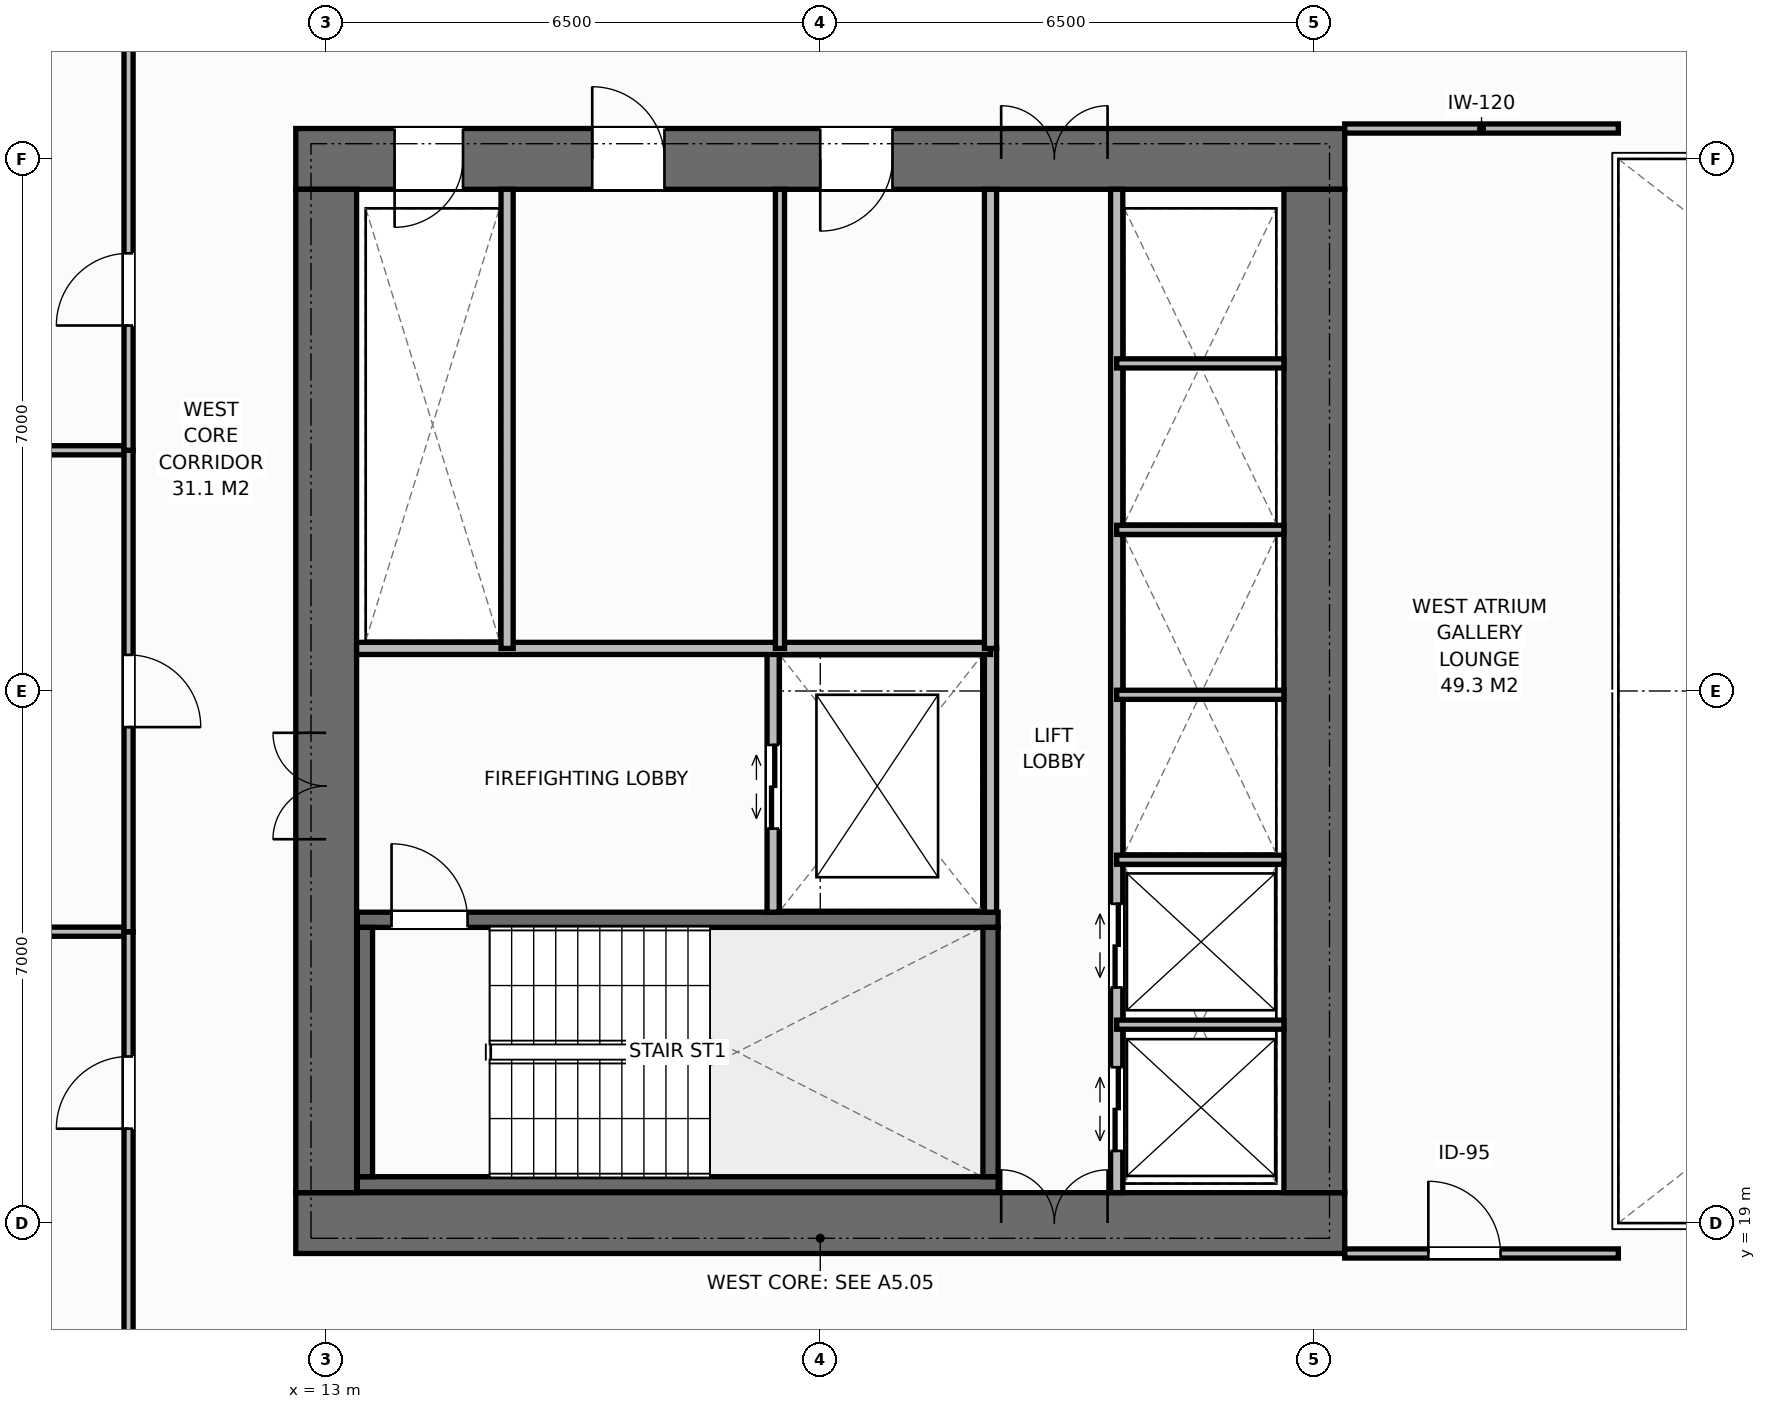
"""IFC4 building model, lengths in metres.
Left out: names, types, materials, properties, quantities, classifications, styles, units other than length and angle.
Written with IfcOpenShell. Run it as: python <this file> out.ifc"""

import sys

from ifc_helpers import new_model, si_unit, direction, frame, frame_2d, origin, place, context, subcontext, project, spatial, rectangle, extrude, element, fill, save


model = new_model("IFC4")
c1 = context("Model", 3, precision=1e-05, world=origin(), true_north=direction((0.0, 1.0)))
c2 = subcontext(c1, "Body", "Model", "MODEL_VIEW")
j1 = project(units=[si_unit("LENGTHUNIT", "METRE"), si_unit("PLANEANGLEUNIT", "RADIAN")], contexts=[c1])
p1 = place(None, origin())
s1 = spatial("IfcSite", under=j1, at=p1, CompositionType="ELEMENT")
p2 = place(p1, origin())
s2 = spatial("IfcBuilding", under=s1, at=p2, CompositionType="ELEMENT")
p3 = place(p2, frame((0.0, 0.0, 58.2)))
s3 = spatial("IfcBuildingStorey", under=s2, at=p3, CompositionType="ELEMENT", Elevation=58.2)
p4 = place(p3, frame((12.6, 19.0, 0.0), z_axis=(0.0, 0.0, 1.0), x_axis=(1.0, 0.0, 0.0)))
e1 = element("IfcWall", 1, at=p4, inside=s3, PredefinedType="SHEAR", context=c2, shape_type="SweptSolid", body=[
    extrude(rectangle(XDim=13.8, YDim=0.8, at=frame_2d((6.9, 0.0))), origin(), (0.0, 0.0, 1.0), 3.8),
])
p5 = place(p4, frame((9.28, 0.0, 0.0)))
e2 = element("IfcOpeningElement", 2, at=p5, cuts=e1, PredefinedType="OPENING", context=c2, shape_type="SweptSolid", body=[
    extrude(rectangle(XDim=1.4, YDim=2.2, at=frame_2d((0.7, 1.1))), frame((0.0, 0.41, 0.0), z_axis=(0.0, -1.0, 0.0), x_axis=(1.0, 0.0, 0.0)), (0.0, 0.0, 1.0), 0.82),
])
p6 = place(p3, frame((12.6, 33.0, 0.0), z_axis=(0.0, 0.0, 1.0), x_axis=(1.0, 0.0, 0.0)))
e3 = element("IfcWall", 3, at=p6, inside=s3, PredefinedType="SHEAR", context=c2, shape_type="SweptSolid", body=[
    extrude(rectangle(XDim=13.8, YDim=0.8, at=frame_2d((6.9, 0.0))), origin(), (0.0, 0.0, 1.0), 3.8),
])
p7 = place(p6, frame((1.3, 0.0, 0.0)))
e4 = element("IfcOpeningElement", 4, at=p7, cuts=e3, PredefinedType="OPENING", context=c2, shape_type="SweptSolid", body=[
    extrude(rectangle(XDim=0.9, YDim=2.15, at=frame_2d((0.45, 1.075))), frame((0.0, 0.41, 0.0), z_axis=(0.0, -1.0, 0.0), x_axis=(1.0, 0.0, 0.0)), (0.0, 0.0, 1.0), 0.82),
])
p8 = place(p6, frame((3.9, 0.0, 0.0)))
e5 = element("IfcOpeningElement", 5, at=p8, cuts=e3, PredefinedType="OPENING", context=c2, shape_type="SweptSolid", body=[
    extrude(rectangle(XDim=0.95, YDim=2.15, at=frame_2d((0.475, 1.075))), frame((0.0, 0.41, 0.0), z_axis=(0.0, -1.0, 0.0), x_axis=(1.0, 0.0, 0.0)), (0.0, 0.0, 1.0), 0.82),
])
p9 = place(p6, frame((6.9, 0.0, 0.0)))
e6 = element("IfcOpeningElement", 6, at=p9, cuts=e3, PredefinedType="OPENING", context=c2, shape_type="SweptSolid", body=[
    extrude(rectangle(XDim=0.95, YDim=2.15, at=frame_2d((0.475, 1.075))), frame((0.0, 0.41, 0.0), z_axis=(0.0, -1.0, 0.0), x_axis=(1.0, 0.0, 0.0)), (0.0, 0.0, 1.0), 0.82),
])
p10 = place(p6, frame((9.28, 0.0, 0.0)))
e7 = element("IfcOpeningElement", 7, at=p10, cuts=e3, PredefinedType="OPENING", context=c2, shape_type="SweptSolid", body=[
    extrude(rectangle(XDim=1.4, YDim=2.2, at=frame_2d((0.7, 1.1))), frame((0.0, 0.41, 0.0), z_axis=(0.0, -1.0, 0.0), x_axis=(1.0, 0.0, 0.0)), (0.0, 0.0, 1.0), 0.82),
])
p11 = place(p3, frame((13.0, 19.4, 0.0), z_axis=(0.0, 0.0, 1.0), x_axis=(0.0, 1.0, 0.0)))
e8 = element("IfcWall", 8, at=p11, inside=s3, PredefinedType="SHEAR", context=c2, shape_type="SweptSolid", body=[
    extrude(rectangle(XDim=13.2, YDim=0.8, at=frame_2d((6.6, 0.0))), origin(), (0.0, 0.0, 1.0), 3.8),
])
p12 = place(p11, frame((4.65, 0.0, 0.0)))
e9 = element("IfcOpeningElement", 9, at=p12, cuts=e8, PredefinedType="OPENING", context=c2, shape_type="SweptSolid", body=[
    extrude(rectangle(XDim=1.4, YDim=2.2, at=frame_2d((0.7, 1.1))), frame((0.0, 0.41, 0.0), z_axis=(0.0, -1.0, 0.0), x_axis=(1.0, 0.0, 0.0)), (0.0, 0.0, 1.0), 0.82),
])
p13 = place(p3, frame((26.0, 19.4, 0.0), z_axis=(0.0, 0.0, 1.0), x_axis=(0.0, 1.0, 0.0)))
e10 = element("IfcWall", 10, at=p13, inside=s3, PredefinedType="SHEAR", context=c2, shape_type="SweptSolid", body=[
    extrude(rectangle(XDim=13.2, YDim=0.8, at=frame_2d((6.6, 0.0))), origin(), (0.0, 0.0, 1.0), 3.8),
])
p14 = place(p3, frame((13.41, 19.51, 0.0), z_axis=(0.0, 0.0, 1.0), x_axis=(1.0, 0.0, 0.0)))
e11 = element("IfcWall", 11, at=p14, inside=s3, PredefinedType="SHEAR", context=c2, shape_type="SweptSolid", body=[
    extrude(rectangle(XDim=8.43, YDim=0.2, at=frame_2d((4.215, 0.0))), origin(), (0.0, 0.0, 1.0), 3.8),
])
p15 = place(p3, frame((13.41, 22.99, 0.0), z_axis=(0.0, 0.0, 1.0), x_axis=(1.0, 0.0, 0.0)))
e12 = element("IfcWall", 12, at=p15, inside=s3, PredefinedType="SHEAR", context=c2, shape_type="SweptSolid", body=[
    extrude(rectangle(XDim=8.43, YDim=0.2, at=frame_2d((4.215, 0.0))), origin(), (0.0, 0.0, 1.0), 3.8),
])
p16 = place(p15, frame((0.45, 0.0, 0.0)))
e13 = element("IfcOpeningElement", 13, at=p16, cuts=e12, PredefinedType="OPENING", context=c2, shape_type="SweptSolid", body=[
    extrude(rectangle(XDim=1.0, YDim=2.15, at=frame_2d((0.5, 1.075))), frame((0.0, 0.11, 0.0), z_axis=(0.0, -1.0, 0.0), x_axis=(1.0, 0.0, 0.0)), (0.0, 0.0, 1.0), 0.22),
])
for number, where, z_axis, x_axis in (
    (14, (13.51, 19.61, 0.0), (0.0, 0.0, 1.0), (0.0, 1.0, 0.0)),
    (15, (21.74, 19.61, 0.0), (0.0, 0.0, 1.0), (0.0, 1.0, 0.0)),
):
    element("IfcWall", number, at=place(p3, frame(where, z_axis=z_axis, x_axis=x_axis)), inside=s3, PredefinedType="SHEAR", context=c2, shape_type="SweptSolid", body=[
        extrude(rectangle(XDim=3.28, YDim=0.2, at=frame_2d((1.64, 0.0))), origin(), (0.0, 0.0, 1.0), 3.8),
    ])
p17 = place(p3, frame((21.74, 23.09, 0.0), z_axis=(0.0, 0.0, 1.0), x_axis=(0.0, 1.0, 0.0)))
e16 = element("IfcWall", 16, at=p17, inside=s3, PredefinedType="STANDARD", context=c2, shape_type="SweptSolid", body=[
    extrude(rectangle(XDim=3.47, YDim=0.16, at=frame_2d((1.735, 0.0))), origin(), (0.0, 0.0, 1.0), 3.55),
])
p18 = place(p3, frame((18.88, 23.09, 0.0), z_axis=(0.0, 0.0, 1.0), x_axis=(0.0, 1.0, 0.0)))
e17 = element("IfcWall", 17, at=p18, inside=s3, PredefinedType="STANDARD", context=c2, shape_type="SweptSolid", body=[
    extrude(rectangle(XDim=3.47, YDim=0.16, at=frame_2d((1.735, 0.0))), origin(), (0.0, 0.0, 1.0), 3.55),
])
p19 = place(p18, frame((1.1, 0.0, 0.0)))
e18 = element("IfcOpeningElement", 18, at=p19, cuts=e17, PredefinedType="OPENING", context=c2, shape_type="SweptSolid", body=[
    extrude(rectangle(XDim=1.1, YDim=2.2, at=frame_2d((0.55, 1.1))), frame((0.0, 0.09, 0.0), z_axis=(0.0, -1.0, 0.0), x_axis=(1.0, 0.0, 0.0)), (0.0, 0.0, 1.0), 0.18),
])
p20 = place(p3, frame((13.4, 26.56, 0.0), z_axis=(0.0, 0.0, 1.0), x_axis=(1.0, 0.0, 0.0)))
e19 = element("IfcWall", 19, at=p20, inside=s3, PredefinedType="STANDARD", context=c2, shape_type="SweptSolid", body=[
    extrude(rectangle(XDim=8.34, YDim=0.16, at=frame_2d((4.17, 0.0))), origin(), (0.0, 0.0, 1.0), 3.55),
])
p21 = place(p3, frame((15.38, 26.56, 0.0), z_axis=(0.0, 0.0, 1.0), x_axis=(0.0, 1.0, 0.0)))
e20 = element("IfcWall", 20, at=p21, inside=s3, PredefinedType="STANDARD", context=c2, shape_type="SweptSolid", body=[
    extrude(rectangle(XDim=6.04, YDim=0.16, at=frame_2d((3.02, 0.0))), origin(), (0.0, 0.0, 1.0), 3.55),
])
p22 = place(p3, frame((18.97, 26.56, 0.0), z_axis=(0.0, 0.0, 1.0), x_axis=(0.0, 1.0, 0.0)))
e21 = element("IfcWall", 21, at=p22, inside=s3, PredefinedType="PARTITIONING", context=c2, shape_type="SweptSolid", body=[
    extrude(rectangle(XDim=6.04, YDim=0.12, at=frame_2d((3.02, 0.0))), origin(), (0.0, 0.0, 1.0), 3.55),
])
p23 = place(p3, frame((21.74, 26.56, 0.0), z_axis=(0.0, 0.0, 1.0), x_axis=(0.0, 1.0, 0.0)))
e22 = element("IfcWall", 22, at=p23, inside=s3, PredefinedType="STANDARD", context=c2, shape_type="SweptSolid", body=[
    extrude(rectangle(XDim=6.04, YDim=0.16, at=frame_2d((3.02, 0.0))), origin(), (0.0, 0.0, 1.0), 3.55),
])
p24 = place(p3, frame((23.4, 19.4, 0.0), z_axis=(0.0, 0.0, 1.0), x_axis=(0.0, 1.0, 0.0)))
e23 = element("IfcWall", 23, at=p24, inside=s3, PredefinedType="STANDARD", context=c2, shape_type="SweptSolid", body=[
    extrude(rectangle(XDim=13.2, YDim=0.16, at=frame_2d((6.6, 0.0))), origin(), (0.0, 0.0, 1.0), 3.55),
])
p25 = place(p24, frame((0.55, 0.0, 0.0)))
e24 = element("IfcOpeningElement", 24, at=p25, cuts=e23, PredefinedType="OPENING", context=c2, shape_type="SweptSolid", body=[
    extrude(rectangle(XDim=1.1, YDim=2.2, at=frame_2d((0.55, 1.1))), frame((0.0, 0.09, 0.0), z_axis=(0.0, -1.0, 0.0), x_axis=(1.0, 0.0, 0.0)), (0.0, 0.0, 1.0), 0.18),
])
p26 = place(p24, frame((2.7, 0.0, 0.0)))
e25 = element("IfcOpeningElement", 25, at=p26, cuts=e23, PredefinedType="OPENING", context=c2, shape_type="SweptSolid", body=[
    extrude(rectangle(XDim=1.1, YDim=2.2, at=frame_2d((0.55, 1.1))), frame((0.0, 0.09, 0.0), z_axis=(0.0, -1.0, 0.0), x_axis=(1.0, 0.0, 0.0)), (0.0, 0.0, 1.0), 0.18),
])
for number, where, z_axis, x_axis in (
    (26, (23.4, 21.61, 0.0), (0.0, 0.0, 1.0), (1.0, 0.0, 0.0)),
    (27, (23.4, 23.78, 0.0), (0.0, 0.0, 1.0), (1.0, 0.0, 0.0)),
    (28, (23.4, 25.95, 0.0), (0.0, 0.0, 1.0), (1.0, 0.0, 0.0)),
    (29, (23.4, 28.12, 0.0), (0.0, 0.0, 1.0), (1.0, 0.0, 0.0)),
    (30, (23.4, 30.31, 0.0), (0.0, 0.0, 1.0), (1.0, 0.0, 0.0)),
):
    element("IfcWall", number, at=place(p3, frame(where, z_axis=z_axis, x_axis=x_axis)), inside=s3, PredefinedType="PARTITIONING", context=c2, shape_type="SweptSolid", body=[
        extrude(rectangle(XDim=2.2, YDim=0.12, at=frame_2d((1.1, 0.0))), origin(), (0.0, 0.0, 1.0), 3.55),
    ])
p27 = place(p3, frame((26.4, 33.4, 0.0), z_axis=(0.0, 0.0, 1.0), x_axis=(1.0, 0.0, 0.0)))
e31 = element("IfcWall", 31, at=p27, inside=s3, PredefinedType="PARTITIONING", context=c2, shape_type="SweptSolid", body=[
    extrude(rectangle(XDim=3.6, YDim=0.12, at=frame_2d((1.8, 0.0))), origin(), (0.0, 0.0, 1.0), 3.55),
])
p28 = place(p3, frame((26.4, 18.6, 0.0), z_axis=(0.0, 0.0, 1.0), x_axis=(1.0, 0.0, 0.0)))
e32 = element("IfcWall", 32, at=p28, inside=s3, PredefinedType="PARTITIONING", context=c2, shape_type="SweptSolid", body=[
    extrude(rectangle(XDim=3.6, YDim=0.12, at=frame_2d((1.8, 0.0))), origin(), (0.0, 0.0, 1.0), 3.55),
])
p29 = place(p28, frame((1.1, 0.0, 0.0)))
e33 = element("IfcOpeningElement", 33, at=p29, cuts=e32, PredefinedType="OPENING", context=c2, shape_type="SweptSolid", body=[
    extrude(rectangle(XDim=0.95, YDim=2.15, at=frame_2d((0.475, 1.075))), frame((0.0, 0.07, 0.0), z_axis=(0.0, -1.0, 0.0), x_axis=(1.0, 0.0, 0.0)), (0.0, 0.0, 1.0), 0.14),
])
p30 = place(p3, frame((-0.18, 22.833, 0.0), z_axis=(0.0, 0.0, 1.0), x_axis=(1.0, 0.0, 0.0)))
e34 = element("IfcWall", 34, at=p30, inside=s3, PredefinedType="PARTITIONING", context=c2, shape_type="SweptSolid", body=[
    extrude(rectangle(XDim=10.58, YDim=0.12, at=frame_2d((5.29, 0.0))), origin(), (0.0, 0.0, 1.0), 3.55),
])
p31 = place(p3, frame((10.4, 16.5, 0.0), z_axis=(0.0, 0.0, 1.0), x_axis=(0.0, 1.0, 0.0)))
e35 = element("IfcWall", 35, at=p31, inside=s3, PredefinedType="PARTITIONING", context=c2, shape_type="SweptSolid", body=[
    extrude(rectangle(XDim=6.333, YDim=0.12, at=frame_2d((3.167, 0.0))), origin(), (0.0, 0.0, 1.0), 3.55),
])
p32 = place(p31, frame((3.742, 0.0, 0.0)))
e36 = element("IfcOpeningElement", 36, at=p32, cuts=e35, PredefinedType="OPENING", context=c2, shape_type="SweptSolid", body=[
    extrude(rectangle(XDim=0.95, YDim=2.15, at=frame_2d((0.475, 1.075))), frame((0.0, 0.07, 0.0), z_axis=(0.0, -1.0, 0.0), x_axis=(1.0, 0.0, 0.0)), (0.0, 0.0, 1.0), 0.14),
])
p33 = place(p3, frame((-0.18, 29.167, 0.0), z_axis=(0.0, 0.0, 1.0), x_axis=(1.0, 0.0, 0.0)))
e37 = element("IfcWall", 37, at=p33, inside=s3, PredefinedType="PARTITIONING", context=c2, shape_type="SweptSolid", body=[
    extrude(rectangle(XDim=10.58, YDim=0.12, at=frame_2d((5.29, 0.0))), origin(), (0.0, 0.0, 1.0), 3.55),
])
p34 = place(p3, frame((10.4, 22.833, 0.0), z_axis=(0.0, 0.0, 1.0), x_axis=(0.0, 1.0, 0.0)))
e38 = element("IfcWall", 38, at=p34, inside=s3, PredefinedType="PARTITIONING", context=c2, shape_type="SweptSolid", body=[
    extrude(rectangle(XDim=6.333, YDim=0.12, at=frame_2d((3.167, 0.0))), origin(), (0.0, 0.0, 1.0), 3.55),
])
p35 = place(p34, frame((2.692, 0.0, 0.0)))
e39 = element("IfcOpeningElement", 39, at=p35, cuts=e38, PredefinedType="OPENING", context=c2, shape_type="SweptSolid", body=[
    extrude(rectangle(XDim=0.95, YDim=2.15, at=frame_2d((0.475, 1.075))), frame((0.0, 0.07, 0.0), z_axis=(0.0, -1.0, 0.0), x_axis=(1.0, 0.0, 0.0)), (0.0, 0.0, 1.0), 0.14),
])
p36 = place(p3, frame((10.4, 29.167, 0.0), z_axis=(0.0, 0.0, 1.0), x_axis=(0.0, 1.0, 0.0)))
e40 = element("IfcWall", 40, at=p36, inside=s3, PredefinedType="PARTITIONING", context=c2, shape_type="SweptSolid", body=[
    extrude(rectangle(XDim=6.333, YDim=0.12, at=frame_2d((3.167, 0.0))), origin(), (0.0, 0.0, 1.0), 3.55),
])
p37 = place(p36, frame((1.642, 0.0, 0.0)))
e41 = element("IfcOpeningElement", 41, at=p37, cuts=e40, PredefinedType="OPENING", context=c2, shape_type="SweptSolid", body=[
    extrude(rectangle(XDim=0.95, YDim=2.15, at=frame_2d((0.475, 1.075))), frame((0.0, 0.07, 0.0), z_axis=(0.0, -1.0, 0.0), x_axis=(1.0, 0.0, 0.0)), (0.0, 0.0, 1.0), 0.14),
])
p38 = place(p16, origin())
e42 = element("IfcDoor", 42, at=p38, inside=s3, OperationType="SINGLE_SWING_LEFT", PredefinedType="DOOR", context=c2, shape_type="SweptSolid", body=[
    extrude(rectangle(XDim=1.0, YDim=2.15, at=frame_2d((0.5, 1.075))), frame((0.0, 0.025, 0.0), z_axis=(0.0, -1.0, 0.0), x_axis=(1.0, 0.0, 0.0)), (0.0, 0.0, 1.0), 0.05),
])
fill(e13, e42)
p39 = place(p12, origin())
e43 = element("IfcDoor", 43, at=p39, inside=s3, OperationType="DOUBLE_DOOR_SINGLE_SWING", PredefinedType="DOOR", context=c2, shape_type="SweptSolid", body=[
    extrude(rectangle(XDim=1.4, YDim=2.2, at=frame_2d((0.7, 1.1))), frame((0.0, 0.025, 0.0), z_axis=(0.0, -1.0, 0.0), x_axis=(1.0, 0.0, 0.0)), (0.0, 0.0, 1.0), 0.05),
])
fill(e9, e43)
p40 = place(p19, origin())
e44 = element("IfcDoor", 44, at=p40, inside=s3, OperationType="DOUBLE_DOOR_SLIDING", PredefinedType="DOOR", context=c2, shape_type="SweptSolid", body=[
    extrude(rectangle(XDim=1.1, YDim=2.2, at=frame_2d((0.55, 1.1))), frame((0.0, 0.025, 0.0), z_axis=(0.0, -1.0, 0.0), x_axis=(1.0, 0.0, 0.0)), (0.0, 0.0, 1.0), 0.05),
])
fill(e18, e44)
p41 = place(p7, origin())
e45 = element("IfcDoor", 45, at=p41, inside=s3, OperationType="SINGLE_SWING_RIGHT", PredefinedType="DOOR", context=c2, shape_type="SweptSolid", body=[
    extrude(rectangle(XDim=0.9, YDim=2.15, at=frame_2d((0.45, 1.075))), frame((0.0, -0.075, 0.0), z_axis=(0.0, -1.0, 0.0), x_axis=(1.0, 0.0, 0.0)), (0.0, 0.0, 1.0), 0.05),
])
fill(e4, e45)
p42 = place(p8, origin())
e46 = element("IfcDoor", 46, at=p42, inside=s3, OperationType="SINGLE_SWING_LEFT", PredefinedType="DOOR", context=c2, shape_type="SweptSolid", body=[
    extrude(rectangle(XDim=0.95, YDim=2.15, at=frame_2d((0.475, 1.075))), frame((0.0, -0.075, 0.0), z_axis=(0.0, -1.0, 0.0), x_axis=(1.0, 0.0, 0.0)), (0.0, 0.0, 1.0), 0.05),
])
fill(e5, e46)
p43 = place(p9, origin())
e47 = element("IfcDoor", 47, at=p43, inside=s3, OperationType="SINGLE_SWING_RIGHT", PredefinedType="DOOR", context=c2, shape_type="SweptSolid", body=[
    extrude(rectangle(XDim=0.95, YDim=2.15, at=frame_2d((0.475, 1.075))), frame((0.0, -0.075, 0.0), z_axis=(0.0, -1.0, 0.0), x_axis=(1.0, 0.0, 0.0)), (0.0, 0.0, 1.0), 0.05),
])
fill(e6, e47)
p44 = place(p5, origin())
e48 = element("IfcDoor", 48, at=p44, inside=s3, OperationType="DOUBLE_DOOR_SINGLE_SWING", PredefinedType="DOOR", context=c2, shape_type="SweptSolid", body=[
    extrude(rectangle(XDim=1.4, YDim=2.2, at=frame_2d((0.7, 1.1))), frame((0.0, 0.125, 0.0), z_axis=(0.0, -1.0, 0.0), x_axis=(1.0, 0.0, 0.0)), (0.0, 0.0, 1.0), 0.05),
])
fill(e2, e48)
p45 = place(p10, origin())
e49 = element("IfcDoor", 49, at=p45, inside=s3, OperationType="DOUBLE_DOOR_SINGLE_SWING", PredefinedType="DOOR", context=c2, shape_type="SweptSolid", body=[
    extrude(rectangle(XDim=1.4, YDim=2.2, at=frame_2d((0.7, 1.1))), frame((0.0, -0.075, 0.0), z_axis=(0.0, -1.0, 0.0), x_axis=(1.0, 0.0, 0.0)), (0.0, 0.0, 1.0), 0.05),
])
fill(e7, e49)
p46 = place(p25, origin())
e50 = element("IfcDoor", 50, at=p46, inside=s3, OperationType="DOUBLE_DOOR_SLIDING", PredefinedType="DOOR", context=c2, shape_type="SweptSolid", body=[
    extrude(rectangle(XDim=1.1, YDim=2.2, at=frame_2d((0.55, 1.1))), frame((0.0, 0.025, 0.0), z_axis=(0.0, -1.0, 0.0), x_axis=(1.0, 0.0, 0.0)), (0.0, 0.0, 1.0), 0.05),
])
fill(e24, e50)
p47 = place(p26, origin())
e51 = element("IfcDoor", 51, at=p47, inside=s3, OperationType="DOUBLE_DOOR_SLIDING", PredefinedType="DOOR", context=c2, shape_type="SweptSolid", body=[
    extrude(rectangle(XDim=1.1, YDim=2.2, at=frame_2d((0.55, 1.1))), frame((0.0, 0.025, 0.0), z_axis=(0.0, -1.0, 0.0), x_axis=(1.0, 0.0, 0.0)), (0.0, 0.0, 1.0), 0.05),
])
fill(e25, e51)
p48 = place(p29, origin())
e52 = element("IfcDoor", 52, at=p48, inside=s3, OperationType="SINGLE_SWING_LEFT", PredefinedType="DOOR", context=c2, shape_type="SweptSolid", body=[
    extrude(rectangle(XDim=0.95, YDim=2.15, at=frame_2d((0.475, 1.075))), frame((0.0, 0.025, 0.0), z_axis=(0.0, -1.0, 0.0), x_axis=(1.0, 0.0, 0.0)), (0.0, 0.0, 1.0), 0.05),
])
fill(e33, e52)
p49 = place(p32, origin())
e53 = element("IfcDoor", 53, at=p49, inside=s3, OperationType="SINGLE_SWING_LEFT", PredefinedType="DOOR", context=c2, shape_type="SweptSolid", body=[
    extrude(rectangle(XDim=0.95, YDim=2.15, at=frame_2d((0.475, 1.075))), frame((0.0, 0.025, 0.0), z_axis=(0.0, -1.0, 0.0), x_axis=(1.0, 0.0, 0.0)), (0.0, 0.0, 1.0), 0.05),
])
fill(e36, e53)
p50 = place(p35, origin())
e54 = element("IfcDoor", 54, at=p50, inside=s3, OperationType="SINGLE_SWING_RIGHT", PredefinedType="DOOR", context=c2, shape_type="SweptSolid", body=[
    extrude(rectangle(XDim=0.95, YDim=2.15, at=frame_2d((0.475, 1.075))), frame((0.0, 0.025, 0.0), z_axis=(0.0, -1.0, 0.0), x_axis=(1.0, 0.0, 0.0)), (0.0, 0.0, 1.0), 0.05),
])
fill(e39, e54)
p51 = place(p37, origin())
e55 = element("IfcDoor", 55, at=p51, inside=s3, OperationType="SINGLE_SWING_LEFT", PredefinedType="DOOR", context=c2, shape_type="SweptSolid", body=[
    extrude(rectangle(XDim=0.95, YDim=2.15, at=frame_2d((0.475, 1.075))), frame((0.0, 0.025, 0.0), z_axis=(0.0, -1.0, 0.0), x_axis=(1.0, 0.0, 0.0)), (0.0, 0.0, 1.0), 0.05),
])
fill(e41, e55)
save(model, sys.argv[1])
